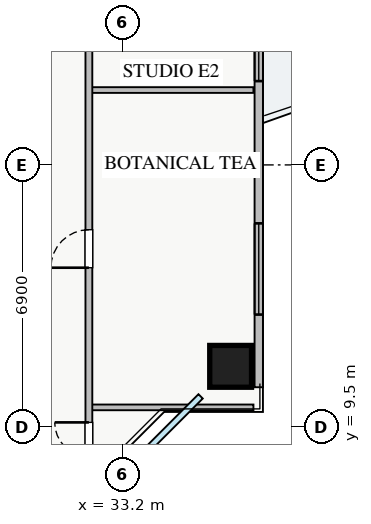
"""IFC4 building model, lengths in metres.
Left out: names, types, materials, properties, quantities, classifications, styles, units other than length and angle.
Written with IfcOpenShell. Run it as: python <this file> out.ifc"""

import sys

from ifc_helpers import new_model, si_unit, direction, frame, frame_2d, origin, origin_2d, place, context, subcontext, project, spatial, rectangle, extrude, source, transform, mapped, element, fill, save


model = new_model("IFC4")
c1 = context("Model", 3, precision=1e-05, world=origin(), true_north=direction((0.0, 1.0)))
c2 = subcontext(c1, "Body", "Model", "MODEL_VIEW")
j1 = project(units=[si_unit("LENGTHUNIT", "METRE"), si_unit("PLANEANGLEUNIT", "RADIAN")], contexts=[c1])
p1 = place(None, origin())
s1 = spatial("IfcSite", under=j1, at=p1, CompositionType="ELEMENT")
p2 = place(p1, origin())
s2 = spatial("IfcBuilding", under=s1, at=p2, CompositionType="ELEMENT")
p3 = place(p2, frame((0.0, 0.0, 110.0)))
s3 = spatial("IfcBuildingStorey", under=s2, at=p3, CompositionType="ELEMENT", Elevation=110.0)
m1 = source(origin(), c2, "Body", "SweptSolid", [
    extrude(rectangle(XDim=1.1, YDim=1.1, at=origin_2d()), origin(), (0.0, 0.0, 1.0), 3.25),
])
p4 = place(p3, frame((36.05, 11.1, 0.0), z_axis=(0.0, 0.0, 1.0), x_axis=(1.0, 0.0, 0.0)))
e1 = element("IfcColumn", 1, at=p4, inside=s3, PredefinedType="COLUMN", context=c2, shape_type="MappedRepresentation", body=[
    mapped(m1, transform((0.0, 0.0, 0.0), x_axis=(1.0, 0.0, 0.0), y_axis=(0.0, 1.0, 0.0), z_axis=(0.0, 0.0, 1.0), scale=1.0)),
])
p5 = place(p3, frame((36.79, 10.55, 0.0), z_axis=(0.0, 0.0, 1.0), x_axis=(0.0, 1.0, 0.0)))
e2 = element("IfcWall", 2, at=p5, inside=s3, PredefinedType="STANDARD", context=c2, shape_type="SweptSolid", body=[
    extrude(rectangle(XDim=24.9, YDim=0.22, at=frame_2d((12.45, 0.0))), origin(), (0.0, 0.0, 1.0), 2.61),
])
p6 = place(p5, frame((13.3, 0.0, 0.0)))
e3 = element("IfcOpeningElement", 3, at=p6, cuts=e2, PredefinedType="OPENING", context=c2, shape_type="SweptSolid", body=[
    extrude(rectangle(XDim=1.2, YDim=2.1, at=frame_2d((0.6, 1.05))), frame((0.0, 0.12, 0.0), z_axis=(0.0, -1.0, 0.0), x_axis=(1.0, 0.0, 0.0)), (0.0, 0.0, 1.0), 0.24),
])
p7 = place(p5, frame((1.912, 0.0, 0.9)))
e4 = element("IfcOpeningElement", 4, at=p7, cuts=e2, PredefinedType="OPENING", context=c2, shape_type="SweptSolid", body=[
    extrude(rectangle(XDim=2.4, YDim=1.48, at=frame_2d((1.2, 0.74))), frame((0.0, 0.12, 0.0), z_axis=(0.0, -1.0, 0.0), x_axis=(1.0, 0.0, 0.0)), (0.0, 0.0, 1.0), 0.24),
])
p8 = place(p5, frame((22.165, 0.0, 0.9)))
e5 = element("IfcOpeningElement", 5, at=p8, cuts=e2, PredefinedType="OPENING", context=c2, shape_type="SweptSolid", body=[
    extrude(rectangle(XDim=2.1, YDim=1.5, at=frame_2d((1.05, 0.75))), frame((0.0, 0.12, 0.0), z_axis=(0.0, -1.0, 0.0), x_axis=(1.0, 0.0, 0.0)), (0.0, 0.0, 1.0), 0.24),
])
p9 = place(p5, frame((18.093, 0.0, 0.9)))
e6 = element("IfcOpeningElement", 6, at=p9, cuts=e2, PredefinedType="OPENING", context=c2, shape_type="SweptSolid", body=[
    extrude(rectangle(XDim=2.4, YDim=1.5, at=frame_2d((1.2, 0.75))), frame((0.0, 0.12, 0.0), z_axis=(0.0, -1.0, 0.0), x_axis=(1.0, 0.0, 0.0)), (0.0, 0.0, 1.0), 0.24),
])
p10 = place(p5, frame((8.055, 0.0, 0.9)))
e7 = element("IfcOpeningElement", 7, at=p10, cuts=e2, PredefinedType="OPENING", context=c2, shape_type="SweptSolid", body=[
    extrude(rectangle(XDim=0.9, YDim=1.2, at=frame_2d((0.45, 0.6))), frame((0.0, 0.12, 0.0), z_axis=(0.0, -1.0, 0.0), x_axis=(1.0, 0.0, 0.0)), (0.0, 0.0, 1.0), 0.24),
])
p11 = place(p3, frame((32.32, 10.02, 0.0), z_axis=(0.0, 0.0, 1.0), x_axis=(1.0, 0.0, 0.0)))
e8 = element("IfcWall", 8, at=p11, inside=s3, PredefinedType="PARTITIONING", context=c2, shape_type="SweptSolid", body=[
    extrude(rectangle(XDim=4.33, YDim=0.15, at=frame_2d((2.165, 0.0))), origin(), (0.0, 0.0, 1.0), 3.07),
])
p12 = place(p3, frame((32.32, 18.37, 0.0), z_axis=(0.0, 0.0, 1.0), x_axis=(1.0, 0.0, 0.0)))
e9 = element("IfcWall", 9, at=p12, inside=s3, PredefinedType="PARTITIONING", context=c2, shape_type="SweptSolid", body=[
    extrude(rectangle(XDim=4.33, YDim=0.15, at=frame_2d((2.165, 0.0))), origin(), (0.0, 0.0, 1.0), 2.821),
])
p13 = place(p3, frame((32.32, 8.31, 0.0), z_axis=(0.0, 0.0, 1.0), x_axis=(0.0, 1.0, 0.0)))
e10 = element("IfcWall", 10, at=p13, inside=s3, PredefinedType="PARTITIONING", context=c2, shape_type="SweptSolid", body=[
    extrude(rectangle(XDim=29.34, YDim=0.18, at=frame_2d((14.67, 0.0))), origin(), (0.0, 0.0, 1.0), 3.07),
])
p14 = place(p13, frame((28.045, 0.0, 0.0)))
e11 = element("IfcOpeningElement", 11, at=p14, cuts=e10, PredefinedType="OPENING", context=c2, shape_type="SweptSolid", body=[
    extrude(rectangle(XDim=0.9, YDim=2.05, at=frame_2d((0.45, 1.025))), frame((0.0, 0.1, 0.0), z_axis=(0.0, -1.0, 0.0), x_axis=(1.0, 0.0, 0.0)), (0.0, 0.0, 1.0), 0.2),
])
p15 = place(p13, frame((0.415, 0.0, 0.0)))
e12 = element("IfcOpeningElement", 12, at=p15, cuts=e10, PredefinedType="OPENING", context=c2, shape_type="SweptSolid", body=[
    extrude(rectangle(XDim=0.9, YDim=2.05, at=frame_2d((0.45, 1.025))), frame((0.0, 0.1, 0.0), z_axis=(0.0, -1.0, 0.0), x_axis=(1.0, 0.0, 0.0)), (0.0, 0.0, 1.0), 0.2),
])
p16 = place(p13, frame((5.385, 0.0, 0.0)))
e13 = element("IfcOpeningElement", 13, at=p16, cuts=e10, PredefinedType="OPENING", context=c2, shape_type="SweptSolid", body=[
    extrude(rectangle(XDim=1.0, YDim=2.05, at=frame_2d((0.5, 1.025))), frame((0.0, 0.1, 0.0), z_axis=(0.0, -1.0, 0.0), x_axis=(1.0, 0.0, 0.0)), (0.0, 0.0, 1.0), 0.2),
])
p17 = place(p13, frame((11.735, 0.0, 0.0)))
e14 = element("IfcOpeningElement", 14, at=p17, cuts=e10, PredefinedType="OPENING", context=c2, shape_type="SweptSolid", body=[
    extrude(rectangle(XDim=1.0, YDim=2.05, at=frame_2d((0.5, 1.025))), frame((0.0, 0.1, 0.0), z_axis=(0.0, -1.0, 0.0), x_axis=(1.0, 0.0, 0.0)), (0.0, 0.0, 1.0), 0.2),
])
p18 = place(p13, frame((20.835, 0.0, 0.0)))
e15 = element("IfcOpeningElement", 15, at=p18, cuts=e10, PredefinedType="OPENING", context=c2, shape_type="SweptSolid", body=[
    extrude(rectangle(XDim=1.0, YDim=2.05, at=frame_2d((0.5, 1.025))), frame((0.0, 0.1, 0.0), z_axis=(0.0, -1.0, 0.0), x_axis=(1.0, 0.0, 0.0)), (0.0, 0.0, 1.0), 0.2),
])
m2 = source(origin(), c2, "Body", "SweptSolid", [
    extrude(rectangle(XDim=2.4, YDim=1.48, at=frame_2d((1.2, 0.74))), frame((0.0, 0.03, 0.0), z_axis=(0.0, -1.0, 0.0), x_axis=(1.0, 0.0, 0.0)), (0.0, 0.0, 1.0), 0.06),
])
p19 = place(p7, origin())
e16 = element("IfcWindow", 16, at=p19, inside=s3, PartitioningType="TRIPLE_PANEL_VERTICAL", PredefinedType="WINDOW", context=c2, shape_type="MappedRepresentation", body=[
    mapped(m2, transform((0.0, 0.0, 0.0), x_axis=(1.0, 0.0, 0.0), y_axis=(0.0, 1.0, 0.0), z_axis=(0.0, 0.0, 1.0), scale=1.0)),
])
fill(e4, e16)
m3 = source(origin(), c2, "Body", "SweptSolid", [
    extrude(rectangle(XDim=0.9, YDim=2.05, at=frame_2d((0.45, 1.025))), frame((0.0, 0.025, 0.0), z_axis=(0.0, -1.0, 0.0), x_axis=(1.0, 0.0, 0.0)), (0.0, 0.0, 1.0), 0.05),
])
p20 = place(p15, origin())
e17 = element("IfcDoor", 17, at=p20, inside=s3, OperationType="SINGLE_SWING_RIGHT", PredefinedType="DOOR", context=c2, shape_type="MappedRepresentation", body=[
    mapped(m3, transform((0.0, 0.0, 0.0), x_axis=(1.0, 0.0, 0.0), y_axis=(0.0, 1.0, 0.0), z_axis=(0.0, 0.0, 1.0), scale=1.0)),
])
fill(e12, e17)
m4 = source(origin(), c2, "Body", "SweptSolid", [
    extrude(rectangle(XDim=1.0, YDim=2.05, at=frame_2d((0.5, 1.025))), frame((0.0, 0.025, 0.0), z_axis=(0.0, -1.0, 0.0), x_axis=(1.0, 0.0, 0.0)), (0.0, 0.0, 1.0), 0.05),
])
p21 = place(p16, origin())
e18 = element("IfcDoor", 18, at=p21, inside=s3, OperationType="SINGLE_SWING_LEFT", PredefinedType="DOOR", context=c2, shape_type="MappedRepresentation", body=[
    mapped(m4, transform((0.0, 0.0, 0.0), x_axis=(1.0, 0.0, 0.0), y_axis=(0.0, 1.0, 0.0), z_axis=(0.0, 0.0, 1.0), scale=1.0)),
])
fill(e13, e18)
m5 = source(origin(), c2, "Body", "SweptSolid", [
    extrude(rectangle(XDim=0.9, YDim=1.2, at=frame_2d((0.45, 0.6))), frame((0.0, 0.03, 0.0), z_axis=(0.0, -1.0, 0.0), x_axis=(1.0, 0.0, 0.0)), (0.0, 0.0, 1.0), 0.06),
])
p22 = place(p10, origin())
e19 = element("IfcWindow", 19, at=p22, inside=s3, PartitioningType="SINGLE_PANEL", PredefinedType="WINDOW", context=c2, shape_type="MappedRepresentation", body=[
    mapped(m5, transform((0.0, 0.0, 0.0), x_axis=(1.0, 0.0, 0.0), y_axis=(0.0, 1.0, 0.0), z_axis=(0.0, 0.0, 1.0), scale=1.0)),
])
fill(e7, e19)
save(model, sys.argv[1])
